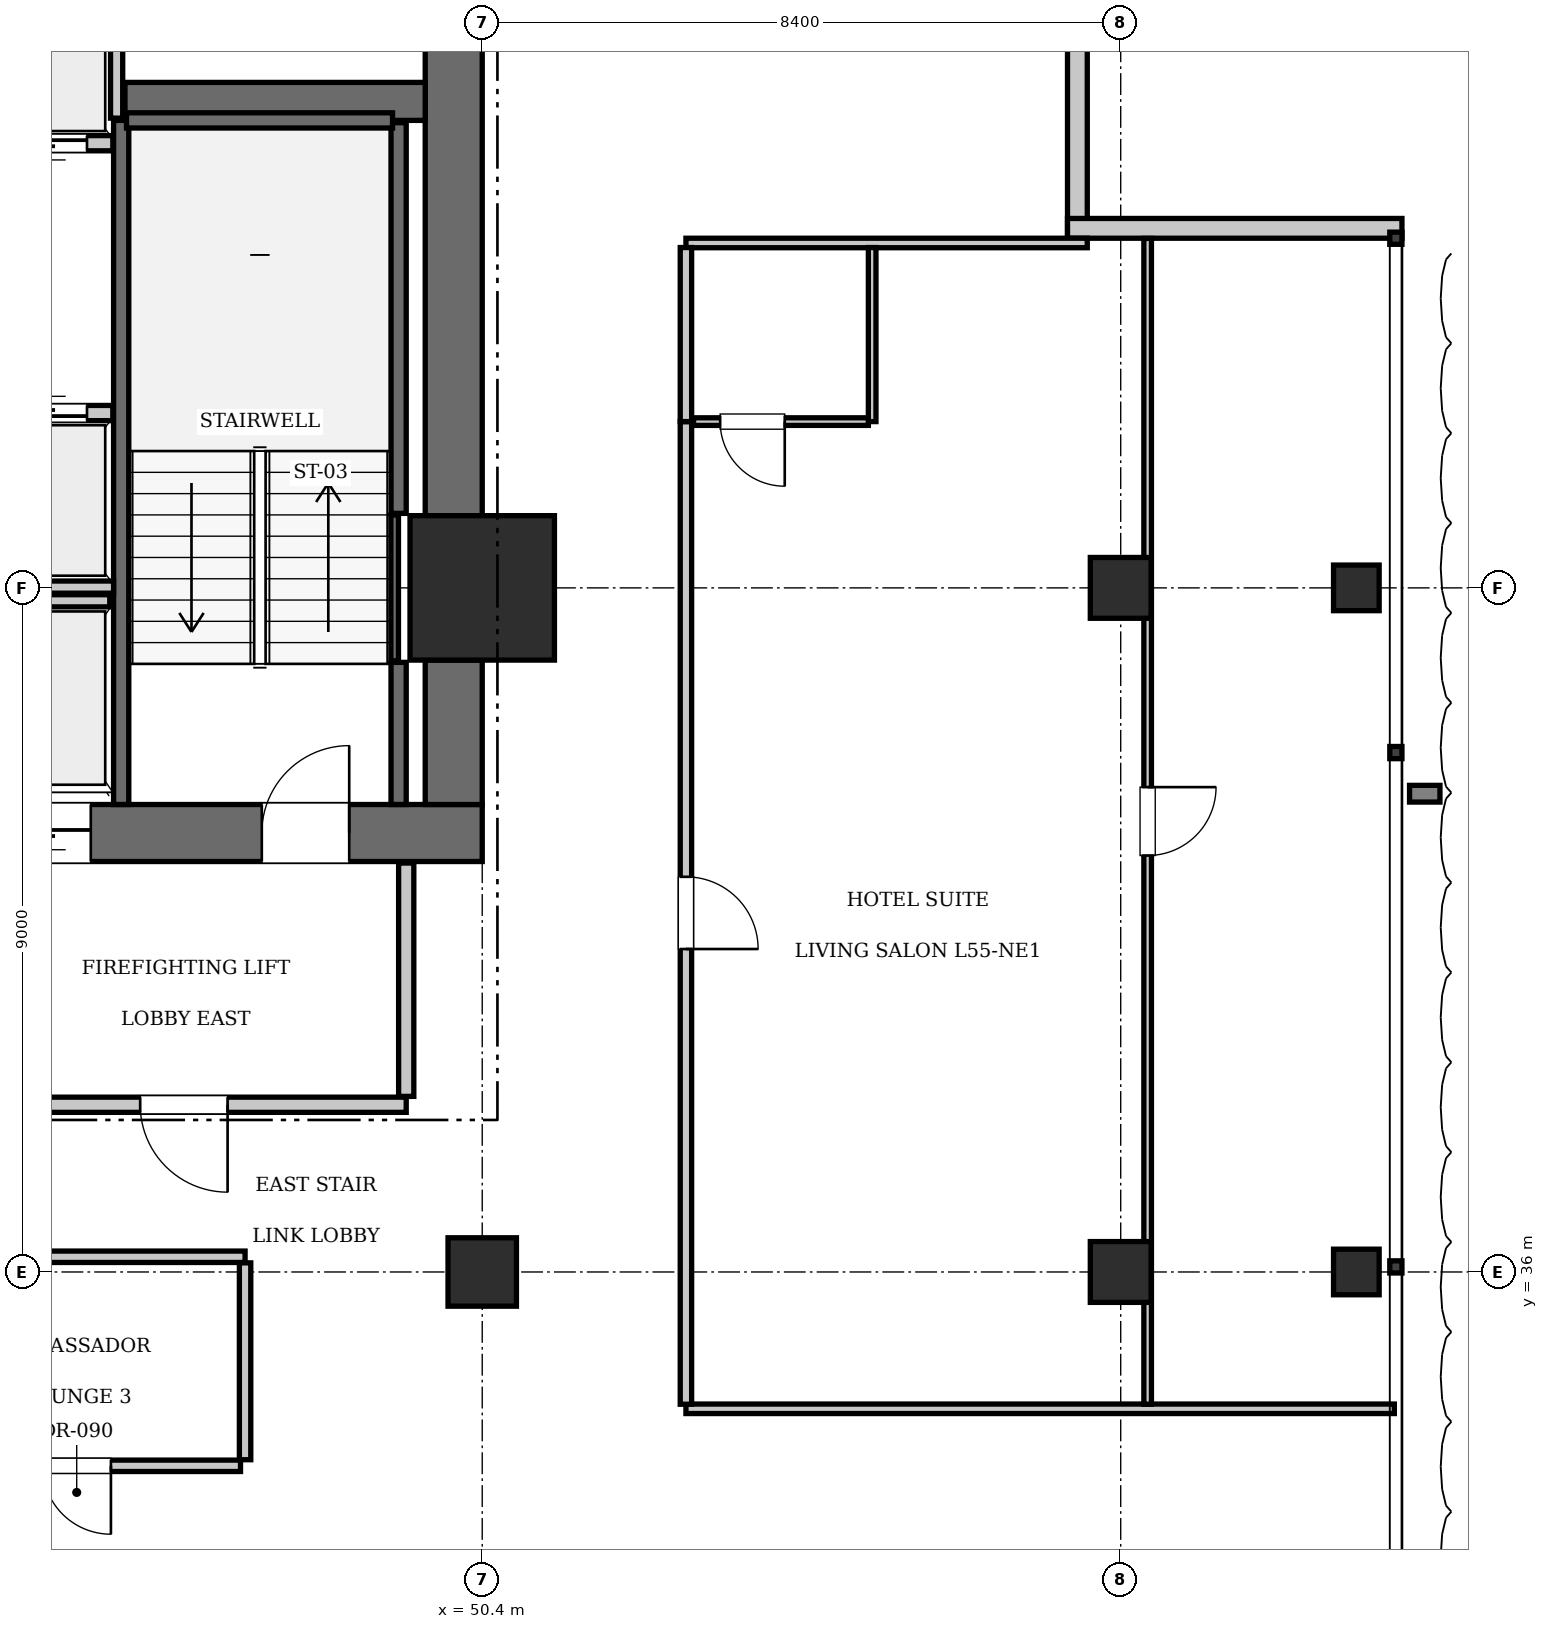
"""IFC4 building model, lengths in metres.
Left out: names, types, materials, properties, quantities, classifications, styles, units other than length and angle.
Written with IfcOpenShell. Run it as: python <this file> out.ifc"""

import sys

from ifc_helpers import new_model, si_unit, direction, frame, frame_2d, origin, origin_2d, place, context, subcontext, project, spatial, rectangle, i_section, extrude, element, fill, save


model = new_model("IFC4")
c1 = context("Model", 3, precision=1e-05, world=origin(), true_north=direction((0.0, 1.0)))
c2 = subcontext(c1, "Body", "Model", "MODEL_VIEW")
j1 = project(units=[si_unit("LENGTHUNIT", "METRE"), si_unit("PLANEANGLEUNIT", "RADIAN")], contexts=[c1])
p1 = place(None, origin())
s1 = spatial("IfcSite", under=j1, at=p1, CompositionType="ELEMENT")
p2 = place(p1, origin())
s2 = spatial("IfcBuilding", under=s1, at=p2, CompositionType="ELEMENT")
p3 = place(p2, frame((0.0, 0.0, 223.65)))
s3 = spatial("IfcBuildingStorey", under=s2, at=p3, CompositionType="ELEMENT", Elevation=223.65)
p4 = place(p3, frame((50.4, 45.0, 0.0), z_axis=(0.0, 0.0, 1.0), x_axis=(1.0, 0.0, 0.0)))
e1 = element("IfcColumn", 1, at=p4, inside=s3, PredefinedType="COLUMN", context=c2, shape_type="SweptSolid", body=[
    extrude(rectangle(XDim=1.9, YDim=1.9, at=origin_2d()), origin(), (0.0, 0.0, 1.0), 3.85),
])
p5 = place(p3, frame((43.6, 41.775, 0.0), z_axis=(0.0, 0.0, 1.0), x_axis=(1.0, 0.0, 0.0)))
e2 = element("IfcWall", 2, at=p5, inside=s3, PredefinedType="SHEAR", context=c2, shape_type="SweptSolid", body=[
    extrude(rectangle(XDim=6.8, YDim=0.75, at=frame_2d((3.4, 0.0))), origin(), (0.0, 0.0, 1.0), 3.85),
])
p6 = place(p5, frame((3.9, 0.0, 0.0)))
e3 = element("IfcOpeningElement", 3, at=p6, cuts=e2, PredefinedType="OPENING", context=c2, shape_type="SweptSolid", body=[
    extrude(rectangle(XDim=1.15, YDim=2.15, at=frame_2d((0.575, 1.075))), frame((0.0, 0.385, 0.0), z_axis=(0.0, -1.0, 0.0), x_axis=(1.0, 0.0, 0.0)), (0.0, 0.0, 1.0), 0.77),
])
p7 = place(p5, frame((0.55, 0.0, 0.0)))
e4 = element("IfcOpeningElement", 4, at=p7, cuts=e2, PredefinedType="OPENING", context=c2, shape_type="SweptSolid", body=[
    extrude(rectangle(XDim=1.1, YDim=2.2, at=frame_2d((0.55, 1.1))), frame((0.0, 0.385, 0.0), z_axis=(0.0, -1.0, 0.0), x_axis=(1.0, 0.0, 0.0)), (0.0, 0.0, 1.0), 0.77),
])
p8 = place(p3, frame((50.025, 42.15, 0.0), z_axis=(0.0, 0.0, 1.0), x_axis=(0.0, 1.0, 0.0)))
e5 = element("IfcWall", 5, at=p8, inside=s3, PredefinedType="SHEAR", context=c2, shape_type="SweptSolid", body=[
    extrude(rectangle(XDim=1.9, YDim=0.75, at=frame_2d((0.95, 0.0))), origin(), (0.0, 0.0, 1.0), 3.85),
])
p9 = place(p3, frame((50.025, 45.95, 0.0), z_axis=(0.0, 0.0, 1.0), x_axis=(0.0, 1.0, 0.0)))
e6 = element("IfcWall", 6, at=p9, inside=s3, PredefinedType="SHEAR", context=c2, shape_type="SweptSolid", body=[
    extrude(rectangle(XDim=7.3, YDim=0.75, at=frame_2d((3.65, 0.0))), origin(), (0.0, 0.0, 1.0), 3.85),
])
p10 = place(p3, frame((45.7, 51.4, 0.0), z_axis=(0.0, 0.0, 1.0), x_axis=(1.0, 0.0, 0.0)))
e7 = element("IfcWall", 7, at=p10, inside=s3, PredefinedType="SHEAR", context=c2, shape_type="SweptSolid", body=[
    extrude(rectangle(XDim=3.95, YDim=0.5, at=frame_2d((1.975, 0.0))), origin(), (0.0, 0.0, 1.0), 3.85),
])
p11 = place(p3, frame((50.4, 36.0, 0.0), z_axis=(0.0, 0.0, 1.0), x_axis=(1.0, 0.0, 0.0)))
e8 = element("IfcColumn", 8, at=p11, inside=s3, PredefinedType="COLUMN", context=c2, shape_type="SweptSolid", body=[
    extrude(rectangle(XDim=0.9, YDim=0.9, at=origin_2d()), origin(), (0.0, 0.0, 1.0), 3.85),
])
for number, where, z_axis, x_axis in (
    (9, (58.8, 36.0, 0.0), (0.0, 0.0, 1.0), (1.0, 0.0, 0.0)),
    (10, (58.8, 45.0, 0.0), (0.0, 0.0, 1.0), (1.0, 0.0, 0.0)),
):
    element("IfcColumn", number, at=place(p3, frame(where, z_axis=z_axis, x_axis=x_axis)), inside=s3, PredefinedType="COLUMN", context=c2, shape_type="SweptSolid", body=[
        extrude(rectangle(XDim=0.8, YDim=0.8, at=origin_2d()), origin(), (0.0, 0.0, 1.0), 3.85),
    ])
for number, where, z_axis, x_axis in (
    (11, (61.9, 36.0, 0.0), (0.0, 0.0, 1.0), (1.0, 0.0, 0.0)),
    (12, (61.9, 45.0, 0.0), (0.0, 0.0, 1.0), (1.0, 0.0, 0.0)),
):
    element("IfcColumn", number, at=place(p3, frame(where, z_axis=z_axis, x_axis=x_axis)), inside=s3, PredefinedType="COLUMN", context=c2, shape_type="SweptSolid", body=[
        extrude(i_section(OverallWidth=0.6, OverallDepth=0.6, WebThickness=0.025, FlangeThickness=0.038, at=origin_2d()), origin(), (0.0, 0.0, 1.0), 3.85),
    ])
p12 = place(p3, frame((45.65, 42.15, 0.0), z_axis=(0.0, 0.0, 1.0), x_axis=(0.0, 1.0, 0.0)))
e13 = element("IfcWall", 13, at=p12, inside=s3, PredefinedType="SOLIDWALL", context=c2, shape_type="SweptSolid", body=[
    extrude(rectangle(XDim=9.0, YDim=0.2, at=frame_2d((4.5, 0.0))), origin(), (0.0, 0.0, 1.0), 3.55),
])
p13 = place(p3, frame((49.3, 42.15, 0.0), z_axis=(0.0, 0.0, 1.0), x_axis=(0.0, 1.0, 0.0)))
e14 = element("IfcWall", 14, at=p13, inside=s3, PredefinedType="SOLIDWALL", context=c2, shape_type="SweptSolid", body=[
    extrude(rectangle(XDim=1.87, YDim=0.2, at=frame_2d((0.935, 0.0))), origin(), (0.0, 0.0, 1.0), 3.55),
])
p14 = place(p3, frame((49.3, 45.98, 0.0), z_axis=(0.0, 0.0, 1.0), x_axis=(0.0, 1.0, 0.0)))
e15 = element("IfcWall", 15, at=p14, inside=s3, PredefinedType="SOLIDWALL", context=c2, shape_type="SweptSolid", body=[
    extrude(rectangle(XDim=5.14, YDim=0.2, at=frame_2d((2.57, 0.0))), origin(), (0.0, 0.0, 1.0), 3.55),
])
p15 = place(p3, frame((45.72, 51.15, 0.0), z_axis=(0.0, 0.0, 1.0), x_axis=(1.0, 0.0, 0.0)))
e16 = element("IfcWall", 16, at=p15, inside=s3, PredefinedType="SOLIDWALL", context=c2, shape_type="SweptSolid", body=[
    extrude(rectangle(XDim=3.5, YDim=0.2, at=frame_2d((1.75, 0.0))), origin(), (0.0, 0.0, 1.0), 3.55),
])
p16 = place(p3, frame((49.248, 44.04, 0.0), z_axis=(0.0, 0.0, 1.0), x_axis=(0.0, 1.0, 0.0)))
e17 = element("IfcWall", 17, at=p16, inside=s3, PredefinedType="SOLIDWALL", context=c2, shape_type="SweptSolid", body=[
    extrude(rectangle(XDim=1.92, YDim=0.1, at=frame_2d((0.96, 0.0))), origin(), (0.0, 0.0, 1.0), 3.55),
])
p17 = place(p3, frame((43.86, 47.3, 0.0), z_axis=(0.0, 0.0, 1.0), x_axis=(1.0, 0.0, 0.0)))
e18 = element("IfcWall", 18, at=p17, inside=s3, PredefinedType="SOLIDWALL", context=c2, shape_type="SweptSolid", body=[
    extrude(rectangle(XDim=1.68, YDim=0.2, at=frame_2d((0.84, 0.0))), origin(), (0.0, 0.0, 1.0), 3.55),
])
p18 = place(p17, frame((0.34, 0.0, 0.0)))
e19 = element("IfcOpeningElement", 19, at=p18, cuts=e18, PredefinedType="OPENING", context=c2, shape_type="SweptSolid", body=[
    extrude(rectangle(XDim=1.0, YDim=2.15, at=frame_2d((0.5, 1.075))), frame((0.0, 0.11, 0.0), z_axis=(0.0, -1.0, 0.0), x_axis=(1.0, 0.0, 0.0)), (0.0, 0.0, 1.0), 0.22),
])
p19 = place(p3, frame((43.86, 50.85, 0.0), z_axis=(0.0, 0.0, 1.0), x_axis=(1.0, 0.0, 0.0)))
e20 = element("IfcWall", 20, at=p19, inside=s3, PredefinedType="SOLIDWALL", context=c2, shape_type="SweptSolid", body=[
    extrude(rectangle(XDim=1.68, YDim=0.2, at=frame_2d((0.84, 0.0))), origin(), (0.0, 0.0, 1.0), 3.55),
])
p20 = place(p19, frame((0.34, 0.0, 0.0)))
e21 = element("IfcOpeningElement", 21, at=p20, cuts=e20, PredefinedType="OPENING", context=c2, shape_type="SweptSolid", body=[
    extrude(rectangle(XDim=1.0, YDim=2.15, at=frame_2d((0.5, 1.075))), frame((0.0, 0.11, 0.0), z_axis=(0.0, -1.0, 0.0), x_axis=(1.0, 0.0, 0.0)), (0.0, 0.0, 1.0), 0.22),
])
p21 = place(p3, frame((43.9, 44.83, 0.0), z_axis=(0.0, 0.0, 1.0), x_axis=(1.0, 0.0, 0.0)))
e22 = element("IfcWall", 22, at=p21, inside=s3, PredefinedType="SOLIDWALL", context=c2, shape_type="SweptSolid", body=[
    extrude(rectangle(XDim=1.6, YDim=0.16, at=frame_2d((0.8, 0.0))), origin(), (0.0, 0.0, 1.0), 3.55),
])
p22 = place(p3, frame((42.1, 45.01, 0.0), z_axis=(0.0, 0.0, 1.0), x_axis=(1.0, 0.0, 0.0)))
e23 = element("IfcWall", 23, at=p22, inside=s3, PredefinedType="SOLIDWALL", context=c2, shape_type="SweptSolid", body=[
    extrude(rectangle(XDim=3.45, YDim=0.16, at=frame_2d((1.725, 0.0))), origin(), (0.0, 0.0, 1.0), 3.55),
])
p23 = place(p3, frame((45.59, 51.18, 0.0), z_axis=(0.0, 0.0, 1.0), x_axis=(0.0, 1.0, 0.0)))
e24 = element("IfcWall", 24, at=p23, inside=s3, PredefinedType="SOLIDWALL", context=c2, shape_type="SweptSolid", body=[
    extrude(rectangle(XDim=2.07, YDim=0.16, at=frame_2d((1.035, 0.0))), origin(), (0.0, 0.0, 1.0), 3.55),
])
for number, where, z_axis, x_axis in (
    (25, (58.23, 54.0, 0.0), (0.0, 0.0, 1.0), (0.0, -1.0, 0.0)),
    (26, (58.1, 49.73, 0.0), (0.0, 0.0, 1.0), (1.0, 0.0, 0.0)),
):
    element("IfcWall", number, at=place(p3, frame(where, z_axis=z_axis, x_axis=x_axis)), inside=s3, PredefinedType="SOLIDWALL", context=c2, shape_type="SweptSolid", body=[
        extrude(rectangle(XDim=4.4, YDim=0.26, at=frame_2d((2.2, 0.0))), origin(), (0.0, 0.0, 1.0), 3.55),
    ])
p24 = place(p3, frame((43.6, 38.2, 0.0), z_axis=(0.0, 0.0, 1.0), x_axis=(1.0, 0.0, 0.0)))
e27 = element("IfcWall", 27, at=p24, inside=s3, PredefinedType="PARTITIONING", context=c2, shape_type="SweptSolid", body=[
    extrude(rectangle(XDim=5.8, YDim=0.2, at=frame_2d((2.9, 0.0))), origin(), (0.0, 0.0, 1.0), 3.55),
])
p25 = place(p24, frame((2.3, 0.0, 0.0)))
e28 = element("IfcOpeningElement", 28, at=p25, cuts=e27, PredefinedType="OPENING", context=c2, shape_type="SweptSolid", body=[
    extrude(rectangle(XDim=1.15, YDim=2.15, at=frame_2d((0.575, 1.075))), frame((0.0, 0.11, 0.0), z_axis=(0.0, -1.0, 0.0), x_axis=(1.0, 0.0, 0.0)), (0.0, 0.0, 1.0), 0.22),
])
p26 = place(p3, frame((49.4, 38.31, 0.0), z_axis=(0.0, 0.0, 1.0), x_axis=(0.0, 1.0, 0.0)))
e29 = element("IfcWall", 29, at=p26, inside=s3, PredefinedType="PARTITIONING", context=c2, shape_type="SweptSolid", body=[
    extrude(rectangle(XDim=3.07, YDim=0.2, at=frame_2d((1.535, 0.0))), origin(), (0.0, 0.0, 1.0), 3.55),
])
p27 = place(p3, frame((42.85, 36.2, 0.0), z_axis=(0.0, 0.0, 1.0), x_axis=(1.0, 0.0, 0.0)))
e30 = element("IfcWall", 30, at=p27, inside=s3, PredefinedType="PARTITIONING", context=c2, shape_type="SweptSolid", body=[
    extrude(rectangle(XDim=4.43, YDim=0.15, at=frame_2d((2.215, 0.0))), origin(), (0.0, 0.0, 1.0), 3.55),
])
p28 = place(p3, frame((47.28, 33.53, 0.0), z_axis=(0.0, 0.0, 1.0), x_axis=(0.0, 1.0, 0.0)))
e31 = element("IfcWall", 31, at=p28, inside=s3, PredefinedType="PARTITIONING", context=c2, shape_type="SweptSolid", body=[
    extrude(rectangle(XDim=2.59, YDim=0.15, at=frame_2d((1.295, 0.0))), origin(), (0.0, 0.0, 1.0), 3.55),
])
p29 = place(p3, frame((42.91, 33.45, 0.0), z_axis=(0.0, 0.0, 1.0), x_axis=(1.0, 0.0, 0.0)))
e32 = element("IfcWall", 32, at=p29, inside=s3, PredefinedType="PARTITIONING", context=c2, shape_type="SweptSolid", body=[
    extrude(rectangle(XDim=4.31, YDim=0.15, at=frame_2d((2.155, 0.0))), origin(), (0.0, 0.0, 1.0), 3.55),
])
p30 = place(p29, frame((1.705, 0.0, 0.0)))
e33 = element("IfcOpeningElement", 33, at=p30, cuts=e32, PredefinedType="OPENING", context=c2, shape_type="SweptSolid", body=[
    extrude(rectangle(XDim=0.9, YDim=2.1, at=frame_2d((0.45, 1.05))), frame((0.0, 0.085, 0.0), z_axis=(0.0, -1.0, 0.0), x_axis=(1.0, 0.0, 0.0)), (0.0, 0.0, 1.0), 0.17),
])
p31 = place(p3, frame((53.08, 34.2, 0.0), z_axis=(0.0, 0.0, 1.0), x_axis=(1.0, 0.0, 0.0)))
e34 = element("IfcWall", 34, at=p31, inside=s3, PredefinedType="PARTITIONING", context=c2, shape_type="SweptSolid", body=[
    extrude(rectangle(XDim=9.32, YDim=0.125, at=frame_2d((4.66, 0.0))), origin(), (0.0, 0.0, 1.0), 3.55),
])
p32 = place(p3, frame((53.08, 49.538, 0.0), z_axis=(0.0, 0.0, 1.0), x_axis=(1.0, 0.0, 0.0)))
e35 = element("IfcWall", 35, at=p32, inside=s3, PredefinedType="PARTITIONING", context=c2, shape_type="SweptSolid", body=[
    extrude(rectangle(XDim=5.28, YDim=0.125, at=frame_2d((2.64, 0.0))), origin(), (0.0, 0.0, 1.0), 3.55),
])
p33 = place(p3, frame((53.08, 34.26, 0.0), z_axis=(0.0, 0.0, 1.0), x_axis=(0.0, 1.0, 0.0)))
e36 = element("IfcWall", 36, at=p33, inside=s3, PredefinedType="PARTITIONING", context=c2, shape_type="SweptSolid", body=[
    extrude(rectangle(XDim=12.927, YDim=0.15, at=frame_2d((6.464, 0.0))), origin(), (0.0, 0.0, 1.0), 3.55),
])
p34 = place(p33, frame((5.989, 0.0, 0.0)))
e37 = element("IfcOpeningElement", 37, at=p34, cuts=e36, PredefinedType="OPENING", context=c2, shape_type="SweptSolid", body=[
    extrude(rectangle(XDim=0.95, YDim=2.15, at=frame_2d((0.475, 1.075))), frame((0.0, 0.085, 0.0), z_axis=(0.0, -1.0, 0.0), x_axis=(1.0, 0.0, 0.0)), (0.0, 0.0, 1.0), 0.17),
])
p35 = place(p3, frame((53.08, 47.188, 0.0), z_axis=(0.0, 0.0, 1.0), x_axis=(0.0, 1.0, 0.0)))
e38 = element("IfcWall", 38, at=p35, inside=s3, PredefinedType="PARTITIONING", context=c2, shape_type="SweptSolid", body=[
    extrude(rectangle(XDim=2.29, YDim=0.15, at=frame_2d((1.145, 0.0))), origin(), (0.0, 0.0, 1.0), 3.55),
])
p36 = place(p3, frame((55.53, 47.188, 0.0), z_axis=(0.0, 0.0, 1.0), x_axis=(0.0, 1.0, 0.0)))
e39 = element("IfcWall", 39, at=p36, inside=s3, PredefinedType="PARTITIONING", context=c2, shape_type="SweptSolid", body=[
    extrude(rectangle(XDim=2.29, YDim=0.1, at=frame_2d((1.145, 0.0))), origin(), (0.0, 0.0, 1.0), 3.55),
])
p37 = place(p3, frame((53.18, 47.188, 0.0), z_axis=(0.0, 0.0, 1.0), x_axis=(1.0, 0.0, 0.0)))
e40 = element("IfcWall", 40, at=p37, inside=s3, PredefinedType="PARTITIONING", context=c2, shape_type="SweptSolid", body=[
    extrude(rectangle(XDim=2.3, YDim=0.1, at=frame_2d((1.15, 0.0))), origin(), (0.0, 0.0, 1.0), 3.55),
])
p38 = place(p37, frame((0.35, 0.0, 0.0)))
e41 = element("IfcOpeningElement", 41, at=p38, cuts=e40, PredefinedType="OPENING", context=c2, shape_type="SweptSolid", body=[
    extrude(rectangle(XDim=0.85, YDim=2.1, at=frame_2d((0.425, 1.05))), frame((0.0, 0.06, 0.0), z_axis=(0.0, -1.0, 0.0), x_axis=(1.0, 0.0, 0.0)), (0.0, 0.0, 1.0), 0.12),
])
p39 = place(p3, frame((59.154, 34.26, 0.0), z_axis=(0.0, 0.0, 1.0), x_axis=(0.0, 1.0, 0.0)))
e42 = element("IfcWall", 42, at=p39, inside=s3, PredefinedType="PARTITIONING", context=c2, shape_type="SweptSolid", body=[
    extrude(rectangle(XDim=15.337, YDim=0.1, at=frame_2d((7.669, 0.0))), origin(), (0.0, 0.0, 1.0), 3.55),
])
p40 = place(p39, frame((7.219, 0.0, 0.0)))
e43 = element("IfcOpeningElement", 43, at=p40, cuts=e42, PredefinedType="OPENING", context=c2, shape_type="SweptSolid", body=[
    extrude(rectangle(XDim=0.9, YDim=2.1, at=frame_2d((0.45, 1.05))), frame((0.0, 0.06, 0.0), z_axis=(0.0, -1.0, 0.0), x_axis=(1.0, 0.0, 0.0)), (0.0, 0.0, 1.0), 0.12),
])
p41 = place(p6, origin())
e44 = element("IfcDoor", 44, at=p41, inside=s3, OperationType="SINGLE_SWING_RIGHT", PredefinedType="DOOR", context=c2, shape_type="SweptSolid", body=[
    extrude(rectangle(XDim=1.15, YDim=2.15, at=frame_2d((0.575, 1.075))), frame((0.0, 0.025, 0.0), z_axis=(0.0, -1.0, 0.0), x_axis=(1.0, 0.0, 0.0)), (0.0, 0.0, 1.0), 0.05),
])
fill(e3, e44)
p42 = place(p18, origin())
e45 = element("IfcDoor", 45, at=p42, inside=s3, OperationType="SLIDING_TO_LEFT", PredefinedType="DOOR", context=c2, shape_type="SweptSolid", body=[
    extrude(rectangle(XDim=1.0, YDim=2.15, at=frame_2d((0.5, 1.075))), frame((0.0, 0.025, 0.0), z_axis=(0.0, -1.0, 0.0), x_axis=(1.0, 0.0, 0.0)), (0.0, 0.0, 1.0), 0.05),
])
fill(e19, e45)
p43 = place(p20, frame((1.0, 0.0, 0.0), z_axis=(0.0, 0.0, 1.0), x_axis=(-1.0, 0.0, 0.0)))
e46 = element("IfcDoor", 46, at=p43, inside=s3, OperationType="SLIDING_TO_LEFT", PredefinedType="DOOR", context=c2, shape_type="SweptSolid", body=[
    extrude(rectangle(XDim=1.0, YDim=2.15, at=frame_2d((0.5, 1.075))), frame((0.0, 0.025, 0.0), z_axis=(0.0, -1.0, 0.0), x_axis=(1.0, 0.0, 0.0)), (0.0, 0.0, 1.0), 0.05),
])
fill(e21, e46)
p44 = place(p7, frame((1.1, 0.0, 0.0), z_axis=(0.0, 0.0, 1.0), x_axis=(-1.0, 0.0, 0.0)))
e47 = element("IfcDoor", 47, at=p44, inside=s3, OperationType="SLIDING_TO_LEFT", PredefinedType="DOOR", context=c2, shape_type="SweptSolid", body=[
    extrude(rectangle(XDim=1.1, YDim=2.2, at=frame_2d((0.55, 1.1))), frame((0.0, 0.025, 0.0), z_axis=(0.0, -1.0, 0.0), x_axis=(1.0, 0.0, 0.0)), (0.0, 0.0, 1.0), 0.05),
])
fill(e4, e47)
p45 = place(p25, frame((1.15, 0.0, 0.0), z_axis=(0.0, 0.0, 1.0), x_axis=(-1.0, 0.0, 0.0)))
e48 = element("IfcDoor", 48, at=p45, inside=s3, OperationType="SINGLE_SWING_LEFT", PredefinedType="DOOR", context=c2, shape_type="SweptSolid", body=[
    extrude(rectangle(XDim=1.15, YDim=2.15, at=frame_2d((0.575, 1.075))), frame((0.0, 0.025, 0.0), z_axis=(0.0, -1.0, 0.0), x_axis=(1.0, 0.0, 0.0)), (0.0, 0.0, 1.0), 0.05),
])
fill(e28, e48)
p46 = place(p30, frame((0.9, 0.0, 0.0), z_axis=(0.0, 0.0, 1.0), x_axis=(-1.0, 0.0, 0.0)))
e49 = element("IfcDoor", 49, at=p46, inside=s3, OperationType="SINGLE_SWING_LEFT", PredefinedType="DOOR", context=c2, shape_type="SweptSolid", body=[
    extrude(rectangle(XDim=0.9, YDim=2.1, at=frame_2d((0.45, 1.05))), frame((0.0, 0.025, 0.0), z_axis=(0.0, -1.0, 0.0), x_axis=(1.0, 0.0, 0.0)), (0.0, 0.0, 1.0), 0.05),
])
fill(e33, e49)
p47 = place(p38, frame((0.85, 0.0, 0.0), z_axis=(0.0, 0.0, 1.0), x_axis=(-1.0, 0.0, 0.0)))
e50 = element("IfcDoor", 50, at=p47, inside=s3, OperationType="SINGLE_SWING_LEFT", PredefinedType="DOOR", context=c2, shape_type="SweptSolid", body=[
    extrude(rectangle(XDim=0.85, YDim=2.1, at=frame_2d((0.425, 1.05))), frame((0.0, 0.025, 0.0), z_axis=(0.0, -1.0, 0.0), x_axis=(1.0, 0.0, 0.0)), (0.0, 0.0, 1.0), 0.05),
])
fill(e41, e50)
p48 = place(p34, frame((0.95, 0.0, 0.0), z_axis=(0.0, 0.0, 1.0), x_axis=(-1.0, 0.0, 0.0)))
e51 = element("IfcDoor", 51, at=p48, inside=s3, OperationType="SINGLE_SWING_RIGHT", PredefinedType="DOOR", context=c2, shape_type="SweptSolid", body=[
    extrude(rectangle(XDim=0.95, YDim=2.15, at=frame_2d((0.475, 1.075))), frame((0.0, 0.025, 0.0), z_axis=(0.0, -1.0, 0.0), x_axis=(1.0, 0.0, 0.0)), (0.0, 0.0, 1.0), 0.05),
])
fill(e37, e51)
p49 = place(p40, frame((0.9, 0.0, 0.0), z_axis=(0.0, 0.0, 1.0), x_axis=(-1.0, 0.0, 0.0)))
e52 = element("IfcDoor", 52, at=p49, inside=s3, OperationType="SINGLE_SWING_LEFT", PredefinedType="DOOR", context=c2, shape_type="SweptSolid", body=[
    extrude(rectangle(XDim=0.9, YDim=2.1, at=frame_2d((0.45, 1.05))), frame((0.0, 0.025, 0.0), z_axis=(0.0, -1.0, 0.0), x_axis=(1.0, 0.0, 0.0)), (0.0, 0.0, 1.0), 0.05),
])
fill(e43, e52)
save(model, sys.argv[1])
